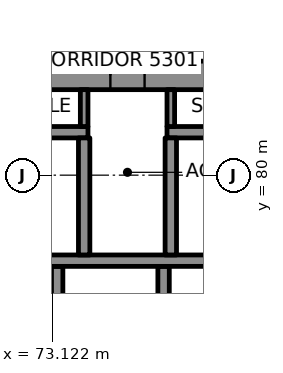
"""IFC4 building model, lengths in metres.
Left out: names, types, materials, properties, quantities, classifications, styles, units other than length and angle.
Written with IfcOpenShell. Run it as: python <this file> out.ifc"""

import sys

from ifc_helpers import new_model, si_unit, direction, frame, frame_2d, origin, place, context, subcontext, project, spatial, rectangle, extrude, element, fill, save


model = new_model("IFC4")
c1 = context("Model", 3, precision=1e-05, world=origin(), true_north=direction((0.0, 1.0)))
c2 = subcontext(c1, "Body", "Model", "MODEL_VIEW")
j1 = project(units=[si_unit("LENGTHUNIT", "METRE"), si_unit("PLANEANGLEUNIT", "RADIAN")], contexts=[c1])
p1 = place(None, origin())
s1 = spatial("IfcSite", under=j1, at=p1, CompositionType="ELEMENT")
p2 = place(p1, origin())
s2 = spatial("IfcBuilding", under=s1, at=p2, CompositionType="ELEMENT")
p3 = place(p2, frame((0.0, 0.0, 226.0)))
s3 = spatial("IfcBuildingStorey", under=s2, at=p3, CompositionType="ELEMENT", Elevation=226.0)
p4 = place(p3, frame((64.0, 82.625, 0.0), z_axis=(0.0, 0.0, 1.0), x_axis=(1.0, 0.0, 0.0)))
e1 = element("IfcWall", 1, at=p4, inside=s3, PredefinedType="SHEAR", context=c2, shape_type="SweptSolid", body=[
    extrude(rectangle(XDim=22.0, YDim=0.75, at=frame_2d((11.0, 0.0))), origin(), (0.0, 0.0, 1.0), 3.7),
])
p5 = place(p4, frame((3.695, 0.0, 0.0)))
e2 = element("IfcOpeningElement", 2, at=p5, cuts=e1, PredefinedType="OPENING", context=c2, shape_type="SweptSolid", body=[
    extrude(rectangle(XDim=1.0, YDim=2.1, at=frame_2d((0.5, 1.05))), frame((0.0, 0.385, 0.0), z_axis=(0.0, -1.0, 0.0), x_axis=(1.0, 0.0, 0.0)), (0.0, 0.0, 1.0), 0.77),
])
p6 = place(p4, frame((17.505, 0.0, 0.0)))
e3 = element("IfcOpeningElement", 3, at=p6, cuts=e1, PredefinedType="OPENING", context=c2, shape_type="SweptSolid", body=[
    extrude(rectangle(XDim=1.0, YDim=2.1, at=frame_2d((0.5, 1.05))), frame((0.0, 0.385, 0.0), z_axis=(0.0, -1.0, 0.0), x_axis=(1.0, 0.0, 0.0)), (0.0, 0.0, 1.0), 0.77),
])
p7 = place(p4, frame((10.65, 0.0, 0.0)))
e4 = element("IfcOpeningElement", 4, at=p7, cuts=e1, PredefinedType="OPENING", context=c2, shape_type="SweptSolid", body=[
    extrude(rectangle(XDim=0.9, YDim=2.1, at=frame_2d((0.45, 1.05))), frame((0.0, 0.385, 0.0), z_axis=(0.0, -1.0, 0.0), x_axis=(1.0, 0.0, 0.0)), (0.0, 0.0, 1.0), 0.77),
])
for number, where, z_axis, x_axis in (
    (5, (73.25, 75.0, 0.0), (0.0, 0.0, 1.0), (0.0, 1.0, 0.0)),
    (6, (76.05, 75.0, 0.0), (0.0, 0.0, 1.0), (0.0, 1.0, 0.0)),
):
    element("IfcWall", number, at=place(p3, frame(where, z_axis=z_axis, x_axis=x_axis)), inside=s3, PredefinedType="SHEAR", context=c2, shape_type="SweptSolid", body=[
        extrude(rectangle(XDim=2.6, YDim=0.3, at=frame_2d((1.3, 0.0))), origin(), (0.0, 0.0, 1.0), 3.7),
    ])
p8 = place(p3, frame((67.15, 77.75, 0.0), z_axis=(0.0, 0.0, 1.0), x_axis=(1.0, 0.0, 0.0)))
e7 = element("IfcWall", 7, at=p8, inside=s3, PredefinedType="SHEAR", context=c2, shape_type="SweptSolid", body=[
    extrude(rectangle(XDim=17.45, YDim=0.3, at=frame_2d((8.725, 0.0))), origin(), (0.0, 0.0, 1.0), 3.7),
])
p9 = place(p8, frame((0.545, 0.0, 0.0)))
e8 = element("IfcOpeningElement", 8, at=p9, cuts=e7, PredefinedType="OPENING", context=c2, shape_type="SweptSolid", body=[
    extrude(rectangle(XDim=1.0, YDim=2.1, at=frame_2d((0.5, 1.05))), frame((0.0, 0.16, 0.0), z_axis=(0.0, -1.0, 0.0), x_axis=(1.0, 0.0, 0.0)), (0.0, 0.0, 1.0), 0.32),
])
p10 = place(p3, frame((67.15, 81.13, 0.0), z_axis=(0.0, 0.0, 1.0), x_axis=(1.0, 0.0, 0.0)))
e9 = element("IfcWall", 9, at=p10, inside=s3, PredefinedType="SHEAR", context=c2, shape_type="SweptSolid", body=[
    extrude(rectangle(XDim=6.91, YDim=0.3, at=frame_2d((3.455, 0.0))), origin(), (0.0, 0.0, 1.0), 3.7),
])
p11 = place(p10, frame((0.545, 0.0, 0.0)))
e10 = element("IfcOpeningElement", 10, at=p11, cuts=e9, PredefinedType="OPENING", context=c2, shape_type="SweptSolid", body=[
    extrude(rectangle(XDim=1.0, YDim=2.1, at=frame_2d((0.5, 1.05))), frame((0.0, 0.16, 0.0), z_axis=(0.0, -1.0, 0.0), x_axis=(1.0, 0.0, 0.0)), (0.0, 0.0, 1.0), 0.32),
])
p12 = place(p3, frame((76.14, 81.13, 0.0), z_axis=(0.0, 0.0, 1.0), x_axis=(1.0, 0.0, 0.0)))
e11 = element("IfcWall", 11, at=p12, inside=s3, PredefinedType="SHEAR", context=c2, shape_type="SweptSolid", body=[
    extrude(rectangle(XDim=6.86, YDim=0.3, at=frame_2d((3.43, 0.0))), origin(), (0.0, 0.0, 1.0), 3.7),
])
p13 = place(p12, frame((5.365, 0.0, 0.0)))
e12 = element("IfcOpeningElement", 12, at=p13, cuts=e11, PredefinedType="OPENING", context=c2, shape_type="SweptSolid", body=[
    extrude(rectangle(XDim=1.0, YDim=2.1, at=frame_2d((0.5, 1.05))), frame((0.0, 0.16, 0.0), z_axis=(0.0, -1.0, 0.0), x_axis=(1.0, 0.0, 0.0)), (0.0, 0.0, 1.0), 0.32),
])
for number, where, z_axis, x_axis in (
    (13, (73.96, 77.9, 0.0), (0.0, 0.0, 1.0), (0.0, 1.0, 0.0)),
    (14, (76.24, 77.9, 0.0), (0.0, 0.0, 1.0), (0.0, 1.0, 0.0)),
):
    element("IfcWall", number, at=place(p3, frame(where, z_axis=z_axis, x_axis=x_axis)), inside=s3, PredefinedType="SHEAR", context=c2, shape_type="SweptSolid", body=[
        extrude(rectangle(XDim=3.08, YDim=0.3, at=frame_2d((1.54, 0.0))), origin(), (0.0, 0.0, 1.0), 3.7),
    ])
for number, where, z_axis, x_axis in (
    (15, (73.96, 81.28, 0.0), (0.0, 0.0, 1.0), (0.0, 1.0, 0.0)),
    (16, (76.24, 81.28, 0.0), (0.0, 0.0, 1.0), (0.0, 1.0, 0.0)),
):
    element("IfcWall", number, at=place(p3, frame(where, z_axis=z_axis, x_axis=x_axis)), inside=s3, PredefinedType="PARTITIONING", context=c2, shape_type="SweptSolid", body=[
        extrude(rectangle(XDim=0.97, YDim=0.2, at=frame_2d((0.485, 0.0))), origin(), (0.0, 0.0, 1.0), 3.7),
    ])
p14 = place(p7, origin())
e17 = element("IfcDoor", 17, at=p14, inside=s3, OperationType="SINGLE_SWING_RIGHT", PredefinedType="DOOR", context=c2, shape_type="SweptSolid", body=[
    extrude(rectangle(XDim=0.9, YDim=2.1, at=frame_2d((0.45, 1.05))), frame((0.0, 0.095, 0.0), z_axis=(0.0, -1.0, 0.0), x_axis=(1.0, 0.0, 0.0)), (0.0, 0.0, 1.0), 0.19),
])
fill(e4, e17)
save(model, sys.argv[1])
